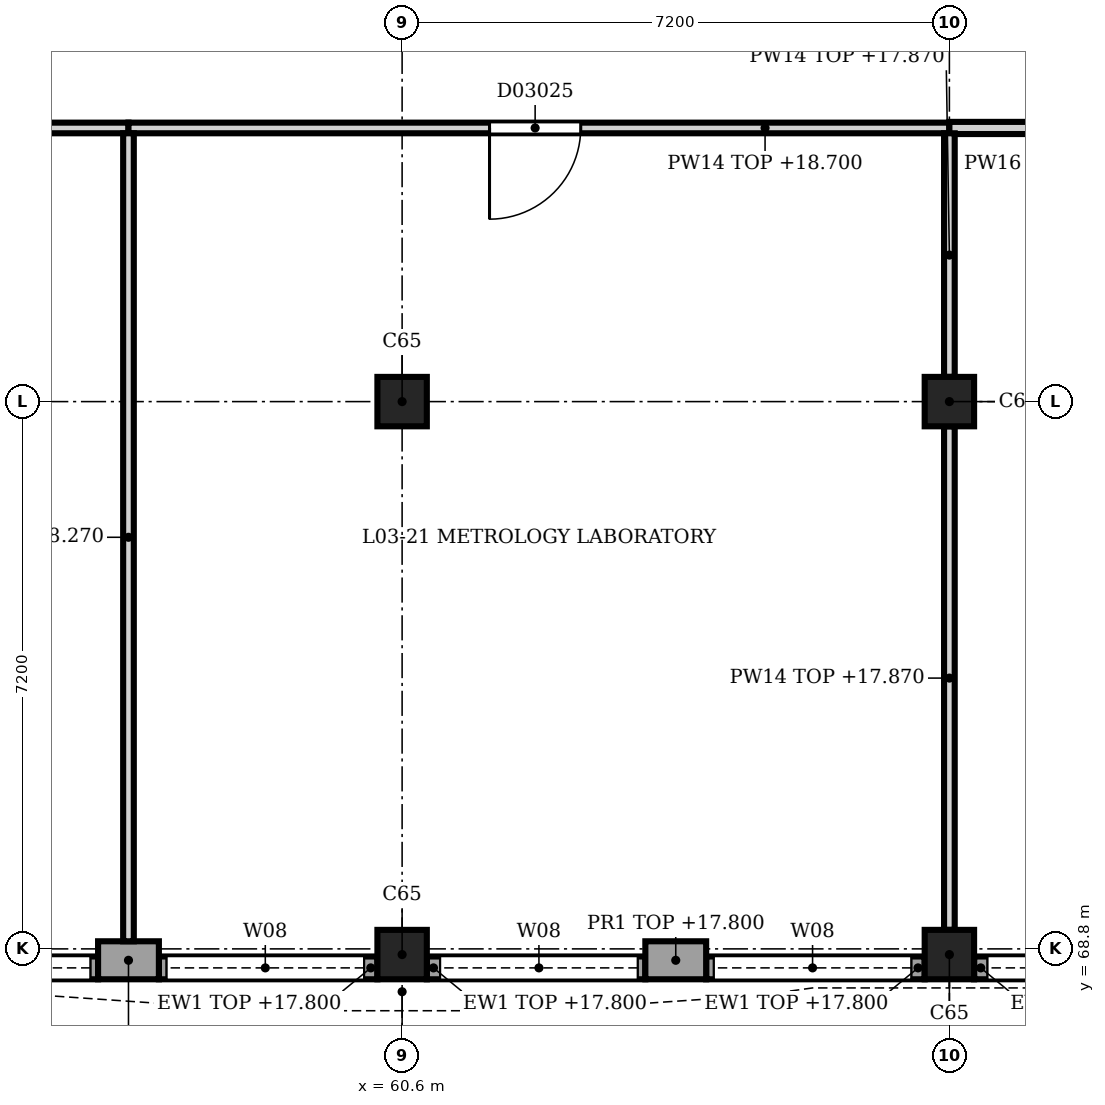
"""IFC4 building model, lengths in metres.
Left out: names, types, materials, properties, quantities, classifications, styles, units other than length and angle.
Written with IfcOpenShell. Run it as: python <this file> out.ifc"""

import sys

from ifc_helpers import new_model, si_unit, direction, frame, frame_2d, origin, origin_2d, place, context, subcontext, project, spatial, rectangle, extrude, element, fill, save


model = new_model("IFC4")
c1 = context("Model", 3, precision=1e-05, world=origin(), true_north=direction((0.0, 1.0)))
c2 = subcontext(c1, "Body", "Model", "MODEL_VIEW")
j1 = project(units=[si_unit("LENGTHUNIT", "METRE"), si_unit("PLANEANGLEUNIT", "RADIAN")], contexts=[c1])
p1 = place(None, origin())
s1 = spatial("IfcSite", under=j1, at=p1, CompositionType="ELEMENT")
p2 = place(p1, origin())
s2 = spatial("IfcBuilding", under=s1, at=p2, CompositionType="ELEMENT")
p3 = place(p2, frame((0.0, 0.0, 14.4)))
s3 = spatial("IfcBuildingStorey", under=s2, at=p3, CompositionType="ELEMENT", Elevation=14.4)
for number, where, z_axis, x_axis in (
    (1, (60.6, 68.725, 0.0), (0.0, 0.0, 1.0), (1.0, 0.0, 0.0)),
    (2, (60.6, 76.0, 0.0), (0.0, 0.0, 1.0), (1.0, 0.0, 0.0)),
    (3, (67.8, 68.725, 0.0), (0.0, 0.0, 1.0), (1.0, 0.0, 0.0)),
    (4, (67.8, 76.0, 0.0), (0.0, 0.0, 1.0), (1.0, 0.0, 0.0)),
):
    element("IfcColumn", number, at=place(p3, frame(where, z_axis=z_axis, x_axis=x_axis)), inside=s3, PredefinedType="COLUMN", context=c2, shape_type="SweptSolid", body=[
        extrude(rectangle(XDim=0.65, YDim=0.65, at=origin_2d()), origin(), (0.0, 0.0, 1.0), 4.5),
    ])
p4 = place(p3, frame((64.6, 68.65, 0.0), z_axis=(0.0, 0.0, 1.0), x_axis=(-1.0, 0.0, 0.0)))
e5 = element("IfcWall", 5, at=p4, inside=s3, PredefinedType="SOLIDWALL", context=c2, shape_type="SweptSolid", body=[
    extrude(rectangle(XDim=0.8, YDim=0.5, at=frame_2d((0.4, 0.0))), origin(), (0.0, 0.0, 1.0), 3.4),
])
p5 = place(p3, frame((57.4, 68.65, 0.0), z_axis=(0.0, 0.0, 1.0), x_axis=(-1.0, 0.0, 0.0)))
e6 = element("IfcWall", 6, at=p5, inside=s3, PredefinedType="SOLIDWALL", context=c2, shape_type="SweptSolid", body=[
    extrude(rectangle(XDim=0.8, YDim=0.5, at=frame_2d((0.4, 0.0))), origin(), (0.0, 0.0, 1.0), 3.4),
])
p6 = place(p3, frame((71.0, 68.55, 0.0), z_axis=(0.0, 0.0, 1.0), x_axis=(-1.0, 0.0, 0.0)))
e7 = element("IfcWall", 7, at=p6, inside=s3, PredefinedType="SOLIDWALL", context=c2, shape_type="SweptSolid", body=[
    extrude(rectangle(XDim=2.875, YDim=0.3, at=frame_2d((1.438, 0.0))), origin(), (0.0, 0.0, 1.0), 3.4),
])
p7 = place(p6, frame((0.1, 0.0, 1.2)))
e8 = element("IfcOpeningElement", 8, at=p7, cuts=e7, PredefinedType="OPENING", context=c2, shape_type="SweptSolid", body=[
    extrude(rectangle(XDim=2.6, YDim=2.1, at=frame_2d((1.3, 1.05))), frame((0.0, 0.16, 0.0), z_axis=(0.0, -1.0, 0.0), x_axis=(1.0, 0.0, 0.0)), (0.0, 0.0, 1.0), 0.32),
])
p8 = place(p3, frame((67.475, 68.55, 0.0), z_axis=(0.0, 0.0, 1.0), x_axis=(-1.0, 0.0, 0.0)))
e9 = element("IfcWall", 9, at=p8, inside=s3, PredefinedType="SOLIDWALL", context=c2, shape_type="SweptSolid", body=[
    extrude(rectangle(XDim=2.875, YDim=0.3, at=frame_2d((1.438, 0.0))), origin(), (0.0, 0.0, 1.0), 3.4),
])
p9 = place(p8, frame((0.175, 0.0, 1.2)))
e10 = element("IfcOpeningElement", 10, at=p9, cuts=e9, PredefinedType="OPENING", context=c2, shape_type="SweptSolid", body=[
    extrude(rectangle(XDim=2.6, YDim=2.1, at=frame_2d((1.3, 1.05))), frame((0.0, 0.16, 0.0), z_axis=(0.0, -1.0, 0.0), x_axis=(1.0, 0.0, 0.0)), (0.0, 0.0, 1.0), 0.32),
])
p10 = place(p3, frame((63.8, 68.55, 0.0), z_axis=(0.0, 0.0, 1.0), x_axis=(-1.0, 0.0, 0.0)))
e11 = element("IfcWall", 11, at=p10, inside=s3, PredefinedType="SOLIDWALL", context=c2, shape_type="SweptSolid", body=[
    extrude(rectangle(XDim=2.875, YDim=0.3, at=frame_2d((1.438, 0.0))), origin(), (0.0, 0.0, 1.0), 3.4),
])
p11 = place(p10, frame((0.1, 0.0, 1.2)))
e12 = element("IfcOpeningElement", 12, at=p11, cuts=e11, PredefinedType="OPENING", context=c2, shape_type="SweptSolid", body=[
    extrude(rectangle(XDim=2.6, YDim=2.1, at=frame_2d((1.3, 1.05))), frame((0.0, 0.16, 0.0), z_axis=(0.0, -1.0, 0.0), x_axis=(1.0, 0.0, 0.0)), (0.0, 0.0, 1.0), 0.32),
])
p12 = place(p3, frame((60.275, 68.55, 0.0), z_axis=(0.0, 0.0, 1.0), x_axis=(-1.0, 0.0, 0.0)))
e13 = element("IfcWall", 13, at=p12, inside=s3, PredefinedType="SOLIDWALL", context=c2, shape_type="SweptSolid", body=[
    extrude(rectangle(XDim=2.875, YDim=0.3, at=frame_2d((1.438, 0.0))), origin(), (0.0, 0.0, 1.0), 3.4),
])
p13 = place(p12, frame((0.175, 0.0, 1.2)))
e14 = element("IfcOpeningElement", 14, at=p13, cuts=e13, PredefinedType="OPENING", context=c2, shape_type="SweptSolid", body=[
    extrude(rectangle(XDim=2.6, YDim=2.1, at=frame_2d((1.3, 1.05))), frame((0.0, 0.16, 0.0), z_axis=(0.0, -1.0, 0.0), x_axis=(1.0, 0.0, 0.0)), (0.0, 0.0, 1.0), 0.32),
])
p14 = place(p3, frame((56.6, 68.55, 0.0), z_axis=(0.0, 0.0, 1.0), x_axis=(-1.0, 0.0, 0.0)))
e15 = element("IfcWall", 15, at=p14, inside=s3, PredefinedType="SOLIDWALL", context=c2, shape_type="SweptSolid", body=[
    extrude(rectangle(XDim=2.875, YDim=0.3, at=frame_2d((1.438, 0.0))), origin(), (0.0, 0.0, 1.0), 3.4),
])
p15 = place(p14, frame((0.1, 0.0, 1.2)))
e16 = element("IfcOpeningElement", 16, at=p15, cuts=e15, PredefinedType="OPENING", context=c2, shape_type="SweptSolid", body=[
    extrude(rectangle(XDim=2.6, YDim=2.1, at=frame_2d((1.3, 1.05))), frame((0.0, 0.16, 0.0), z_axis=(0.0, -1.0, 0.0), x_axis=(1.0, 0.0, 0.0)), (0.0, 0.0, 1.0), 0.32),
])
p16 = place(p3, frame((57.0, 79.6, 0.0), z_axis=(0.0, 0.0, 1.0), x_axis=(-1.0, 0.0, 0.0)))
e17 = element("IfcWall", 17, at=p16, inside=s3, PredefinedType="PARTITIONING", context=c2, shape_type="SweptSolid", body=[
    extrude(rectangle(XDim=14.4, YDim=0.14, at=frame_2d((7.2, 0.0))), origin(), (0.0, 0.0, 1.0), 4.3),
])
p17 = place(p16, frame((6.65, 0.0, 0.0)))
e18 = element("IfcOpeningElement", 18, at=p17, cuts=e17, PredefinedType="OPENING", context=c2, shape_type="SweptSolid", body=[
    extrude(rectangle(XDim=1.2, YDim=2.1, at=frame_2d((0.6, 1.05))), frame((0.0, 0.08, 0.0), z_axis=(0.0, -1.0, 0.0), x_axis=(1.0, 0.0, 0.0)), (0.0, 0.0, 1.0), 0.16),
])
p18 = place(p3, frame((67.8, 79.6, 0.0), z_axis=(0.0, 0.0, 1.0), x_axis=(-1.0, 0.0, 0.0)))
e19 = element("IfcWall", 19, at=p18, inside=s3, PredefinedType="PARTITIONING", context=c2, shape_type="SweptSolid", body=[
    extrude(rectangle(XDim=10.8, YDim=0.14, at=frame_2d((5.4, 0.0))), origin(), (0.0, 0.0, 1.0), 4.3),
])
p19 = place(p18, frame((4.85, 0.0, 0.0)))
e20 = element("IfcOpeningElement", 20, at=p19, cuts=e19, PredefinedType="OPENING", context=c2, shape_type="SweptSolid", body=[
    extrude(rectangle(XDim=1.2, YDim=2.1, at=frame_2d((0.6, 1.05))), frame((0.0, 0.08, 0.0), z_axis=(0.0, -1.0, 0.0), x_axis=(1.0, 0.0, 0.0)), (0.0, 0.0, 1.0), 0.16),
])
p20 = place(p3, frame((75.0, 79.6, 0.0), z_axis=(0.0, 0.0, 1.0), x_axis=(-1.0, 0.0, 0.0)))
e21 = element("IfcWall", 21, at=p20, inside=s3, PredefinedType="PARTITIONING", context=c2, shape_type="SweptSolid", body=[
    extrude(rectangle(XDim=7.2, YDim=0.16, at=frame_2d((3.6, 0.0))), origin(), (0.0, 0.0, 1.0), 4.3),
])
p21 = place(p20, frame((2.95, 0.0, 0.0)))
e22 = element("IfcOpeningElement", 22, at=p21, cuts=e21, PredefinedType="OPENING", context=c2, shape_type="SweptSolid", body=[
    extrude(rectangle(XDim=1.3, YDim=2.2, at=frame_2d((0.65, 1.1))), frame((0.0, 0.09, 0.0), z_axis=(0.0, -1.0, 0.0), x_axis=(1.0, 0.0, 0.0)), (0.0, 0.0, 1.0), 0.18),
])
p22 = place(p3, frame((57.0, 68.9, 0.0), z_axis=(0.0, 0.0, 1.0), x_axis=(0.0, 1.0, 0.0)))
e23 = element("IfcWall", 23, at=p22, inside=s3, PredefinedType="PARTITIONING", context=c2, shape_type="SweptSolid", body=[
    extrude(rectangle(XDim=10.63, YDim=0.14, at=frame_2d((5.315, 0.0))), origin(), (0.0, 0.0, 1.0), 3.87),
])
p23 = place(p3, frame((67.8, 69.05, 0.0), z_axis=(0.0, 0.0, 1.0), x_axis=(0.0, 1.0, 0.0)))
e24 = element("IfcWall", 24, at=p23, inside=s3, PredefinedType="PARTITIONING", context=c2, shape_type="SweptSolid", body=[
    extrude(rectangle(XDim=6.625, YDim=0.14, at=frame_2d((3.312, 0.0))), origin(), (0.0, 0.0, 1.0), 3.47),
])
p24 = place(p3, frame((67.8, 76.325, 0.0), z_axis=(0.0, 0.0, 1.0), x_axis=(0.0, 1.0, 0.0)))
e25 = element("IfcWall", 25, at=p24, inside=s3, PredefinedType="PARTITIONING", context=c2, shape_type="SweptSolid", body=[
    extrude(rectangle(XDim=3.205, YDim=0.14, at=frame_2d((1.603, 0.0))), origin(), (0.0, 0.0, 1.0), 3.47),
])
p25 = place(p7, origin())
e26 = element("IfcWindow", 26, at=p25, inside=s3, PartitioningType="SINGLE_PANEL", PredefinedType="WINDOW", context=c2, shape_type="SweptSolid", body=[
    extrude(rectangle(XDim=2.6, YDim=2.1, at=frame_2d((1.3, 1.05))), frame((0.0, 0.03, 0.0), z_axis=(0.0, -1.0, 0.0), x_axis=(1.0, 0.0, 0.0)), (0.0, 0.0, 1.0), 0.06),
])
fill(e8, e26)
p26 = place(p9, origin())
e27 = element("IfcWindow", 27, at=p26, inside=s3, PartitioningType="SINGLE_PANEL", PredefinedType="WINDOW", context=c2, shape_type="SweptSolid", body=[
    extrude(rectangle(XDim=2.6, YDim=2.1, at=frame_2d((1.3, 1.05))), frame((0.0, 0.03, 0.0), z_axis=(0.0, -1.0, 0.0), x_axis=(1.0, 0.0, 0.0)), (0.0, 0.0, 1.0), 0.06),
])
fill(e10, e27)
p27 = place(p11, origin())
e28 = element("IfcWindow", 28, at=p27, inside=s3, PartitioningType="SINGLE_PANEL", PredefinedType="WINDOW", context=c2, shape_type="SweptSolid", body=[
    extrude(rectangle(XDim=2.6, YDim=2.1, at=frame_2d((1.3, 1.05))), frame((0.0, 0.03, 0.0), z_axis=(0.0, -1.0, 0.0), x_axis=(1.0, 0.0, 0.0)), (0.0, 0.0, 1.0), 0.06),
])
fill(e12, e28)
p28 = place(p13, origin())
e29 = element("IfcWindow", 29, at=p28, inside=s3, PartitioningType="SINGLE_PANEL", PredefinedType="WINDOW", context=c2, shape_type="SweptSolid", body=[
    extrude(rectangle(XDim=2.6, YDim=2.1, at=frame_2d((1.3, 1.05))), frame((0.0, 0.03, 0.0), z_axis=(0.0, -1.0, 0.0), x_axis=(1.0, 0.0, 0.0)), (0.0, 0.0, 1.0), 0.06),
])
fill(e14, e29)
p29 = place(p15, origin())
e30 = element("IfcWindow", 30, at=p29, inside=s3, PartitioningType="SINGLE_PANEL", PredefinedType="WINDOW", context=c2, shape_type="SweptSolid", body=[
    extrude(rectangle(XDim=2.6, YDim=2.1, at=frame_2d((1.3, 1.05))), frame((0.0, 0.03, 0.0), z_axis=(0.0, -1.0, 0.0), x_axis=(1.0, 0.0, 0.0)), (0.0, 0.0, 1.0), 0.06),
])
fill(e16, e30)
p30 = place(p19, origin())
e31 = element("IfcDoor", 31, at=p30, inside=s3, OperationType="SINGLE_SWING_RIGHT", PredefinedType="DOOR", context=c2, shape_type="SweptSolid", body=[
    extrude(rectangle(XDim=1.2, YDim=2.1, at=frame_2d((0.6, 1.05))), frame((0.0, 0.025, 0.0), z_axis=(0.0, -1.0, 0.0), x_axis=(1.0, 0.0, 0.0)), (0.0, 0.0, 1.0), 0.05),
])
fill(e20, e31)
save(model, sys.argv[1])
